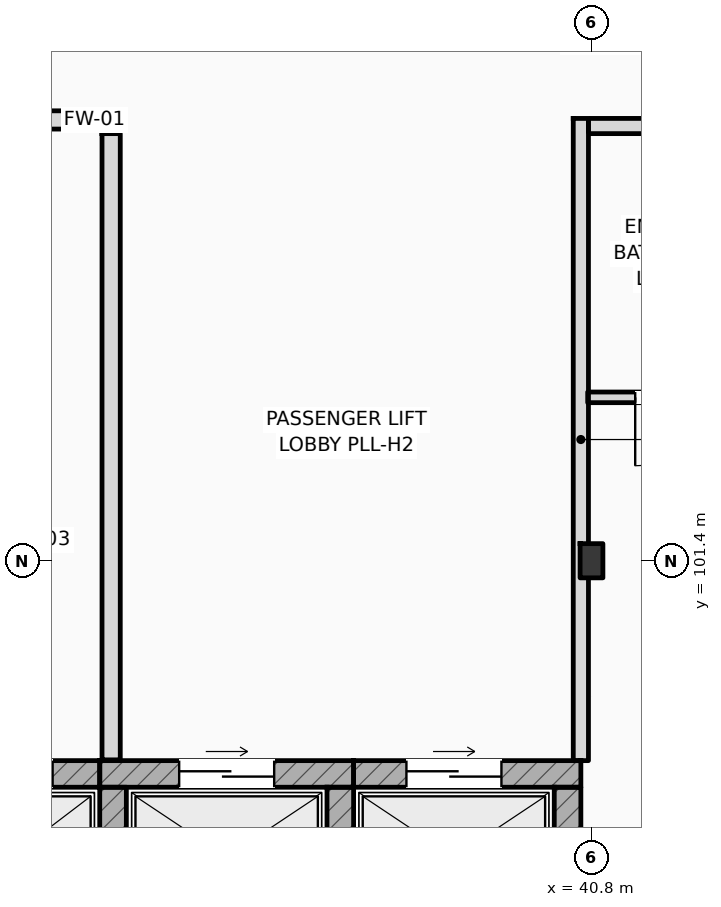
"""IFC4 building model, lengths in metres.
Left out: names, types, materials, properties, quantities, classifications, styles, units other than length and angle.
Written with IfcOpenShell. Run it as: python <this file> out.ifc"""

import sys

from ifc_helpers import new_model, si_unit, direction, frame, frame_2d, origin, origin_2d, place, context, subcontext, project, spatial, rectangle, i_section, extrude, element, fill, save


model = new_model("IFC4")
c1 = context("Model", 3, precision=1e-05, world=origin(), true_north=direction((0.0, 1.0)))
c2 = subcontext(c1, "Body", "Model", "MODEL_VIEW")
j1 = project(units=[si_unit("LENGTHUNIT", "METRE"), si_unit("PLANEANGLEUNIT", "RADIAN")], contexts=[c1])
p1 = place(None, origin())
s1 = spatial("IfcSite", under=j1, at=p1, CompositionType="ELEMENT")
p2 = place(p1, origin())
s2 = spatial("IfcBuilding", under=s1, at=p2, CompositionType="ELEMENT")
p3 = place(p2, frame((0.0, 0.0, 31.8)))
s3 = spatial("IfcBuildingStorey", under=s2, at=p3, CompositionType="ELEMENT", Elevation=31.8)
p4 = place(p3, frame((40.8, 101.4, 0.0), z_axis=(0.0, 0.0, 1.0), x_axis=(1.0, 0.0, 0.0)))
e1 = element("IfcColumn", 1, at=p4, inside=s3, PredefinedType="COLUMN", context=c2, shape_type="SweptSolid", body=[
    extrude(i_section(OverallWidth=0.3, OverallDepth=0.45, WebThickness=0.014, FlangeThickness=0.026, FilletRadius=0.027, at=origin_2d()), origin(), (0.0, 0.0, 1.0), 3.6),
])
p5 = place(p3, frame((31.64, 98.595, 0.0), z_axis=(0.0, 0.0, 1.0), x_axis=(1.0, 0.0, 0.0)))
e2 = element("IfcWall", 2, at=p5, inside=s3, PredefinedType="SHEAR", context=c2, shape_type="SweptSolid", body=[
    extrude(rectangle(XDim=2.69, YDim=0.35, at=frame_2d((1.345, 0.0))), origin(), (0.0, 0.0, 1.0), 3.36),
])
p6 = place(p5, frame((0.97, 0.0, 0.0)))
e3 = element("IfcOpeningElement", 3, at=p6, cuts=e2, PredefinedType="OPENING", context=c2, shape_type="SweptSolid", body=[
    extrude(rectangle(XDim=1.1, YDim=2.2, at=frame_2d((0.55, 1.1))), frame((0.0, 0.185, 0.0), z_axis=(0.0, -1.0, 0.0), x_axis=(1.0, 0.0, 0.0)), (0.0, 0.0, 1.0), 0.37),
])
p7 = place(p3, frame((34.33, 98.595, 0.0), z_axis=(0.0, 0.0, 1.0), x_axis=(1.0, 0.0, 0.0)))
e4 = element("IfcWall", 4, at=p7, inside=s3, PredefinedType="SHEAR", context=c2, shape_type="SweptSolid", body=[
    extrude(rectangle(XDim=3.34, YDim=0.35, at=frame_2d((1.67, 0.0))), origin(), (0.0, 0.0, 1.0), 3.36),
])
p8 = place(p7, frame((1.045, 0.0, 0.0)))
e5 = element("IfcOpeningElement", 5, at=p8, cuts=e4, PredefinedType="OPENING", context=c2, shape_type="SweptSolid", body=[
    extrude(rectangle(XDim=1.25, YDim=2.25, at=frame_2d((0.625, 1.125))), frame((0.0, 0.185, 0.0), z_axis=(0.0, -1.0, 0.0), x_axis=(1.0, 0.0, 0.0)), (0.0, 0.0, 1.0), 0.37),
])
for number, where, z_axis, x_axis in (
    (6, (34.505, 96.58, 0.0), (0.0, 0.0, 1.0), (0.0, 1.0, 0.0)),
    (7, (37.495, 96.58, 0.0), (0.0, 0.0, 1.0), (0.0, 1.0, 0.0)),
):
    element("IfcWall", number, at=place(p3, frame(where, z_axis=z_axis, x_axis=x_axis)), inside=s3, PredefinedType="SHEAR", context=c2, shape_type="SweptSolid", body=[
        extrude(rectangle(XDim=1.84, YDim=0.35, at=frame_2d((0.92, 0.0))), origin(), (0.0, 0.0, 1.0), 3.36),
    ])
p9 = place(p3, frame((37.67, 98.595, 0.0), z_axis=(0.0, 0.0, 1.0), x_axis=(1.0, 0.0, 0.0)))
e8 = element("IfcWall", 8, at=p9, inside=s3, PredefinedType="SHEAR", context=c2, shape_type="SweptSolid", body=[
    extrude(rectangle(XDim=2.99, YDim=0.35, at=frame_2d((1.495, 0.0))), origin(), (0.0, 0.0, 1.0), 3.36),
])
p10 = place(p9, frame((0.695, 0.0, 0.0)))
e9 = element("IfcOpeningElement", 9, at=p10, cuts=e8, PredefinedType="OPENING", context=c2, shape_type="SweptSolid", body=[
    extrude(rectangle(XDim=1.25, YDim=2.25, at=frame_2d((0.625, 1.125))), frame((0.0, 0.185, 0.0), z_axis=(0.0, -1.0, 0.0), x_axis=(1.0, 0.0, 0.0)), (0.0, 0.0, 1.0), 0.37),
])
p11 = place(p3, frame((40.485, 96.58, 0.0), z_axis=(0.0, 0.0, 1.0), x_axis=(0.0, 1.0, 0.0)))
e10 = element("IfcWall", 10, at=p11, inside=s3, PredefinedType="SHEAR", context=c2, shape_type="SweptSolid", body=[
    extrude(rectangle(XDim=1.84, YDim=0.35, at=frame_2d((0.92, 0.0))), origin(), (0.0, 0.0, 1.0), 2.99),
])
p12 = place(p3, frame((34.48, 98.78, 0.0), z_axis=(0.0, 0.0, 1.0), x_axis=(0.0, 1.0, 0.0)))
e11 = element("IfcWall", 11, at=p12, inside=s3, PredefinedType="STANDARD", context=c2, shape_type="SweptSolid", body=[
    extrude(rectangle(XDim=8.24, YDim=0.24, at=frame_2d((4.12, 0.0))), origin(), (0.0, 0.0, 1.0), 3.36),
])
p13 = place(p3, frame((30.56, 107.2, 0.0), z_axis=(0.0, 0.0, 1.0), x_axis=(1.0, 0.0, 0.0)))
e12 = element("IfcWall", 12, at=p13, inside=s3, PredefinedType="STANDARD", context=c2, shape_type="SweptSolid", body=[
    extrude(rectangle(XDim=4.1, YDim=0.24, at=frame_2d((2.05, 0.0))), origin(), (0.0, 0.0, 1.0), 3.36),
])
p14 = place(p13, frame((1.3, 0.0, 0.0)))
e13 = element("IfcOpeningElement", 13, at=p14, cuts=e12, PredefinedType="OPENING", context=c2, shape_type="SweptSolid", body=[
    extrude(rectangle(XDim=1.1, YDim=2.2, at=frame_2d((0.55, 1.1))), frame((0.0, 0.13, 0.0), z_axis=(0.0, -1.0, 0.0), x_axis=(1.0, 0.0, 0.0)), (0.0, 0.0, 1.0), 0.26),
])
p15 = place(p3, frame((40.76, 107.12, 0.0), z_axis=(0.0, 0.0, 1.0), x_axis=(1.0, 0.0, 0.0)))
e14 = element("IfcWall", 14, at=p15, inside=s3, PredefinedType="PARTITIONING", context=c2, shape_type="SweptSolid", body=[
    extrude(rectangle(XDim=23.44, YDim=0.2, at=frame_2d((11.72, 0.0))), origin(), (0.0, 0.0, 1.0), 3.36),
])
p16 = place(p15, frame((2.429, 0.0, 0.0)))
e15 = element("IfcOpeningElement", 15, at=p16, cuts=e14, PredefinedType="OPENING", context=c2, shape_type="SweptSolid", body=[
    extrude(rectangle(XDim=0.96, YDim=2.2, at=frame_2d((0.48, 1.1))), frame((0.0, 0.11, 0.0), z_axis=(0.0, -1.0, 0.0), x_axis=(1.0, 0.0, 0.0)), (0.0, 0.0, 1.0), 0.22),
])
p17 = place(p15, frame((4.243, 0.0, 0.0)))
e16 = element("IfcOpeningElement", 16, at=p17, cuts=e14, PredefinedType="OPENING", context=c2, shape_type="SweptSolid", body=[
    extrude(rectangle(XDim=0.96, YDim=2.2, at=frame_2d((0.48, 1.1))), frame((0.0, 0.11, 0.0), z_axis=(0.0, -1.0, 0.0), x_axis=(1.0, 0.0, 0.0)), (0.0, 0.0, 1.0), 0.22),
])
p18 = place(p15, frame((10.301, 0.0, 0.0)))
e17 = element("IfcOpeningElement", 17, at=p18, cuts=e14, PredefinedType="OPENING", context=c2, shape_type="SweptSolid", body=[
    extrude(rectangle(XDim=0.96, YDim=2.2, at=frame_2d((0.48, 1.1))), frame((0.0, 0.11, 0.0), z_axis=(0.0, -1.0, 0.0), x_axis=(1.0, 0.0, 0.0)), (0.0, 0.0, 1.0), 0.22),
])
p19 = place(p15, frame((12.059, 0.0, 0.0)))
e18 = element("IfcOpeningElement", 18, at=p19, cuts=e14, PredefinedType="OPENING", context=c2, shape_type="SweptSolid", body=[
    extrude(rectangle(XDim=0.96, YDim=2.2, at=frame_2d((0.48, 1.1))), frame((0.0, 0.11, 0.0), z_axis=(0.0, -1.0, 0.0), x_axis=(1.0, 0.0, 0.0)), (0.0, 0.0, 1.0), 0.22),
])
p20 = place(p15, frame((18.118, 0.0, 0.0)))
e19 = element("IfcOpeningElement", 19, at=p20, cuts=e14, PredefinedType="OPENING", context=c2, shape_type="SweptSolid", body=[
    extrude(rectangle(XDim=0.96, YDim=2.2, at=frame_2d((0.48, 1.1))), frame((0.0, 0.11, 0.0), z_axis=(0.0, -1.0, 0.0), x_axis=(1.0, 0.0, 0.0)), (0.0, 0.0, 1.0), 0.22),
])
p21 = place(p15, frame((19.821, 0.0, 0.0)))
e20 = element("IfcOpeningElement", 20, at=p21, cuts=e14, PredefinedType="OPENING", context=c2, shape_type="SweptSolid", body=[
    extrude(rectangle(XDim=0.96, YDim=2.2, at=frame_2d((0.48, 1.1))), frame((0.0, 0.11, 0.0), z_axis=(0.0, -1.0, 0.0), x_axis=(1.0, 0.0, 0.0)), (0.0, 0.0, 1.0), 0.22),
])
p22 = place(p3, frame((40.66, 98.77, 0.0), z_axis=(0.0, 0.0, 1.0), x_axis=(0.0, 1.0, 0.0)))
e21 = element("IfcWall", 21, at=p22, inside=s3, PredefinedType="PARTITIONING", context=c2, shape_type="SweptSolid", body=[
    extrude(rectangle(XDim=8.45, YDim=0.2, at=frame_2d((4.225, 0.0))), origin(), (0.0, 0.0, 1.0), 2.99),
])
p23 = place(p3, frame((40.75, 103.55, 0.0), z_axis=(0.0, 0.0, 1.0), x_axis=(1.0, 0.0, 0.0)))
e22 = element("IfcWall", 22, at=p23, inside=s3, PredefinedType="PARTITIONING", context=c2, shape_type="SweptSolid", body=[
    extrude(rectangle(XDim=2.15, YDim=0.14, at=frame_2d((1.075, 0.0))), origin(), (0.0, 0.0, 1.0), 3.36),
])
p24 = place(p23, frame((0.625, 0.0, 0.0)))
e23 = element("IfcOpeningElement", 23, at=p24, cuts=e22, PredefinedType="OPENING", context=c2, shape_type="SweptSolid", body=[
    extrude(rectangle(XDim=0.9, YDim=2.1, at=frame_2d((0.45, 1.05))), frame((0.0, 0.08, 0.0), z_axis=(0.0, -1.0, 0.0), x_axis=(1.0, 0.0, 0.0)), (0.0, 0.0, 1.0), 0.16),
])
p25 = place(p6, origin())
e24 = element("IfcDoor", 24, at=p25, inside=s3, OperationType="SLIDING_TO_LEFT", PredefinedType="DOOR", context=c2, shape_type="SweptSolid", body=[
    extrude(rectangle(XDim=1.1, YDim=2.2, at=frame_2d((0.55, 1.1))), frame((0.0, 0.025, 0.0), z_axis=(0.0, -1.0, 0.0), x_axis=(1.0, 0.0, 0.0)), (0.0, 0.0, 1.0), 0.05),
])
fill(e3, e24)
p26 = place(p8, origin())
e25 = element("IfcDoor", 25, at=p26, inside=s3, OperationType="SLIDING_TO_LEFT", PredefinedType="DOOR", context=c2, shape_type="SweptSolid", body=[
    extrude(rectangle(XDim=1.25, YDim=2.25, at=frame_2d((0.625, 1.125))), frame((0.0, 0.025, 0.0), z_axis=(0.0, -1.0, 0.0), x_axis=(1.0, 0.0, 0.0)), (0.0, 0.0, 1.0), 0.05),
])
fill(e5, e25)
p27 = place(p10, origin())
e26 = element("IfcDoor", 26, at=p27, inside=s3, OperationType="SLIDING_TO_LEFT", PredefinedType="DOOR", context=c2, shape_type="SweptSolid", body=[
    extrude(rectangle(XDim=1.25, YDim=2.25, at=frame_2d((0.625, 1.125))), frame((0.0, 0.025, 0.0), z_axis=(0.0, -1.0, 0.0), x_axis=(1.0, 0.0, 0.0)), (0.0, 0.0, 1.0), 0.05),
])
fill(e9, e26)
p28 = place(p24, frame((0.9, 0.0, 0.0), z_axis=(0.0, 0.0, 1.0), x_axis=(-1.0, 0.0, 0.0)))
e27 = element("IfcDoor", 27, at=p28, inside=s3, OperationType="SINGLE_SWING_LEFT", PredefinedType="DOOR", context=c2, shape_type="SweptSolid", body=[
    extrude(rectangle(XDim=0.9, YDim=2.1, at=frame_2d((0.45, 1.05))), frame((0.0, 0.025, 0.0), z_axis=(0.0, -1.0, 0.0), x_axis=(1.0, 0.0, 0.0)), (0.0, 0.0, 1.0), 0.05),
])
fill(e23, e27)
save(model, sys.argv[1])
